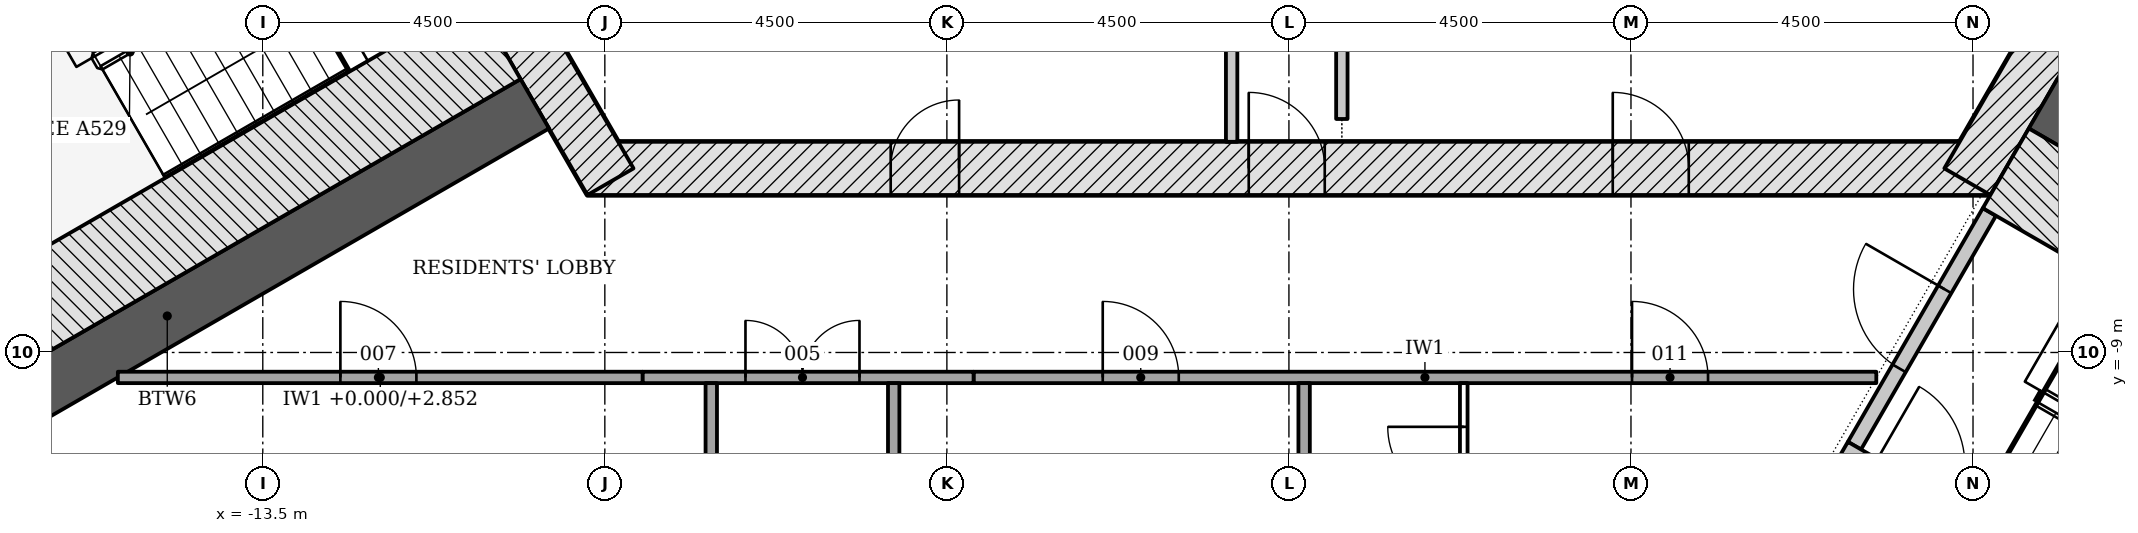
"""IFC4 building model, lengths in metres.
Left out: names, types, materials, properties, quantities, classifications, styles, units other than length and angle.
Written with IfcOpenShell. Run it as: python <this file> out.ifc"""

import sys

from ifc_helpers import new_model, si_unit, direction, frame, frame_2d, origin, place, context, subcontext, project, spatial, rectangle, extrude, element, fill, save


model = new_model("IFC4")
c1 = context("Model", 3, precision=1e-05, world=origin(), true_north=direction((0.0, 1.0)))
c2 = subcontext(c1, "Body", "Model", "MODEL_VIEW")
j1 = project(units=[si_unit("LENGTHUNIT", "METRE"), si_unit("PLANEANGLEUNIT", "RADIAN")], contexts=[c1])
p1 = place(None, origin())
s1 = spatial("IfcSite", under=j1, at=p1, CompositionType="ELEMENT")
p2 = place(p1, origin())
s2 = spatial("IfcBuilding", under=s1, at=p2, CompositionType="ELEMENT")
p3 = place(p2, frame((0.0, 0.0, 140.1)))
s3 = spatial("IfcBuildingStorey", under=s2, at=p3, CompositionType="ELEMENT", Elevation=140.1)
p4 = place(p3, frame((-9.229, -6.578, -0.2), z_axis=(0.0, 0.0, 1.0), x_axis=(1.0, 0.0, 0.0)))
e1 = element("IfcWall", 1, at=p4, inside=s3, PredefinedType="SHEAR", context=c2, shape_type="SweptSolid", body=[
    extrude(rectangle(XDim=18.458, YDim=0.7, at=frame_2d((9.229, 0.0))), origin(), (0.0, 0.0, 1.0), 3.6),
])
p5 = place(p4, frame((8.7, 0.0, 0.2)))
e2 = element("IfcOpeningElement", 2, at=p5, cuts=e1, PredefinedType="OPENING", context=c2, shape_type="SweptSolid", body=[
    extrude(rectangle(XDim=1.0, YDim=2.1, at=frame_2d((0.5, 1.05))), frame((0.0, 0.36, 0.0), z_axis=(0.0, -1.0, 0.0), x_axis=(1.0, 0.0, 0.0)), (0.0, 0.0, 1.0), 0.72),
])
p6 = place(p4, frame((3.99, 0.0, 0.2)))
e3 = element("IfcOpeningElement", 3, at=p6, cuts=e1, PredefinedType="OPENING", context=c2, shape_type="SweptSolid", body=[
    extrude(rectangle(XDim=0.9, YDim=2.1, at=frame_2d((0.45, 1.05))), frame((0.0, 0.36, 0.0), z_axis=(0.0, -1.0, 0.0), x_axis=(1.0, 0.0, 0.0)), (0.0, 0.0, 1.0), 0.72),
])
p7 = place(p4, frame((13.489, 0.0, 0.2)))
e4 = element("IfcOpeningElement", 4, at=p7, cuts=e1, PredefinedType="OPENING", context=c2, shape_type="SweptSolid", body=[
    extrude(rectangle(XDim=1.0, YDim=2.1, at=frame_2d((0.5, 1.05))), frame((0.0, 0.36, 0.0), z_axis=(0.0, -1.0, 0.0), x_axis=(1.0, 0.0, 0.0)), (0.0, 0.0, 1.0), 0.72),
])
for number, where, z_axis, x_axis in (
    (5, (8.926, -6.753, -0.2), (0.0, 0.0, 1.0), (0.5, 0.866, 0.0)),
    (6, (-10.311, -4.353, -0.2), (0.0, 0.0, 1.0), (0.5, -0.866, 0.0)),
):
    element("IfcWall", number, at=place(p3, frame(where, z_axis=z_axis, x_axis=x_axis)), inside=s3, PredefinedType="SHEAR", context=c2, shape_type="SweptSolid", body=[
        extrude(rectangle(XDim=2.771, YDim=0.7, at=frame_2d((1.386, 0.0))), origin(), (0.0, 0.0, 1.0), 3.6),
    ])
for number, where, z_axis, x_axis in (
    (7, (-9.922, -5.728, -0.2), (0.0, 0.0, 1.0), (-0.866, -0.5, 0.0)),
    (8, (9.922, -5.728, -0.2), (0.0, 0.0, 1.0), (0.866, -0.5, 0.0)),
):
    element("IfcWall", number, at=place(p3, frame(where, z_axis=z_axis, x_axis=x_axis)), inside=s3, PredefinedType="SHEAR", context=c2, shape_type="SweptSolid", body=[
        extrude(rectangle(XDim=11.167, YDim=0.75, at=frame_2d((5.583, 0.0))), origin(), (0.0, 0.0, 1.0), 3.6),
    ])
p8 = place(p3, frame((-0.754, 5.772, 0.0), z_axis=(0.0, 0.0, 1.0), x_axis=(0.0, -1.0, 0.0)))
e9 = element("IfcWall", 9, at=p8, inside=s3, PredefinedType="PARTITIONING", context=c2, shape_type="SweptSolid", body=[
    extrude(rectangle(XDim=12.0, YDim=0.15, at=frame_2d((6.0, 0.0))), origin(), (0.0, 0.0, 1.0), 3.4),
])
p9 = place(p8, frame((4.051, 0.0, 0.0)))
e10 = element("IfcOpeningElement", 10, at=p9, cuts=e9, PredefinedType="OPENING", context=c2, shape_type="SweptSolid", body=[
    extrude(rectangle(XDim=0.9, YDim=2.1, at=frame_2d((0.45, 1.05))), frame((0.0, 0.085, 0.0), z_axis=(0.0, -1.0, 0.0), x_axis=(1.0, 0.0, 0.0)), (0.0, 0.0, 1.0), 0.17),
])
p10 = place(p3, frame((0.696, -5.928, 0.0), z_axis=(0.0, 0.0, 1.0), x_axis=(0.0, 1.0, 0.0)))
e11 = element("IfcWall", 11, at=p10, inside=s3, PredefinedType="PARTITIONING", context=c2, shape_type="SweptSolid", body=[
    extrude(rectangle(XDim=11.549, YDim=0.15, at=frame_2d((5.774, 0.0))), origin(), (0.0, 0.0, 1.0), 3.4),
])
p11 = place(p10, frame((6.673, 0.0, 0.0)))
e12 = element("IfcOpeningElement", 12, at=p11, cuts=e11, PredefinedType="OPENING", context=c2, shape_type="SweptSolid", body=[
    extrude(rectangle(XDim=0.9, YDim=2.1, at=frame_2d((0.45, 1.05))), frame((0.0, 0.085, 0.0), z_axis=(0.0, -1.0, 0.0), x_axis=(1.0, 0.0, 0.0)), (0.0, 0.0, 1.0), 0.17),
])
p12 = place(p3, frame((-10.412, -4.879, -0.2), z_axis=(0.0, 0.0, 1.0), x_axis=(-0.866026919366, -0.499997374926, 0.0)))
e13 = element("IfcWall", 13, at=p12, inside=s3, PredefinedType="SHEAR", context=c2, shape_type="SweptSolid", body=[
    extrude(rectangle(XDim=7.2, YDim=1.211, at=frame_2d((3.6, 0.0))), origin(), (0.0, 0.0, 1.0), 3.6),
])
p13 = place(p3, frame((7.44, -10.226, -0.2), z_axis=(0.0, 0.0, 1.0), x_axis=(0.500022077904, 0.866012656725, 0.0)))
e14 = element("IfcWall", 14, at=p13, inside=s3, PredefinedType="SHEAR", context=c2, shape_type="SweptSolid", body=[
    extrude(rectangle(XDim=3.55, YDim=0.2, at=frame_2d((1.775, 0.0))), origin(), (0.0, 0.0, 1.0), 3.6),
])
p14 = place(p13, frame((1.175, 0.0, 0.2)))
e15 = element("IfcOpeningElement", 15, at=p14, cuts=e14, PredefinedType="OPENING", context=c2, shape_type="SweptSolid", body=[
    extrude(rectangle(XDim=1.2, YDim=2.1, at=frame_2d((0.6, 1.05))), frame((0.0, 0.11, 0.0), z_axis=(0.0, -1.0, 0.0), x_axis=(1.0, 0.0, 0.0)), (0.0, 0.0, 1.0), 0.22),
])
p15 = place(p3, frame((7.304, -10.262, -0.2), z_axis=(0.0, 0.0, 1.0), x_axis=(0.866026594901, -0.49999793692, 0.0)))
e16 = element("IfcWall", 16, at=p15, inside=s3, PredefinedType="SHEAR", context=c2, shape_type="SweptSolid", body=[
    extrude(rectangle(XDim=5.6, YDim=0.2, at=frame_2d((2.8, 0.0))), origin(), (0.0, 0.0, 1.0), 3.6),
])
p16 = place(p15, frame((0.45, 0.0, 0.2)))
e17 = element("IfcOpeningElement", 17, at=p16, cuts=e16, PredefinedType="OPENING", context=c2, shape_type="SweptSolid", body=[
    extrude(rectangle(XDim=1.2, YDim=2.1, at=frame_2d((0.6, 1.05))), frame((0.0, 0.11, 0.0), z_axis=(0.0, -1.0, 0.0), x_axis=(1.0, 0.0, 0.0)), (0.0, 0.0, 1.0), 0.22),
])
p17 = place(p3, frame((9.431, -6.577, -0.2), z_axis=(0.0, 0.0, 1.0), x_axis=(0.866018442252, -0.500012057535, 0.0)))
e18 = element("IfcWall", 18, at=p17, inside=s3, PredefinedType="SHEAR", context=c2, shape_type="SweptSolid", body=[
    extrude(rectangle(XDim=7.2, YDim=1.211, at=frame_2d((3.6, 0.0))), origin(), (0.0, 0.0, 1.0), 3.6),
])
p18 = place(p3, frame((15.782, -8.679, 0.0), z_axis=(0.0, 0.0, 1.0), x_axis=(-0.500008408626, 0.866020549008, 0.0)))
e19 = element("IfcWall", 19, at=p18, inside=s3, PredefinedType="PARTITIONING", context=c2, shape_type="SweptSolid", body=[
    extrude(rectangle(XDim=11.258, YDim=0.15, at=frame_2d((5.629, 0.0))), origin(), (0.0, 0.0, 1.0), 2.852),
])
p19 = place(p3, frame((-15.407, -9.328, 0.0), z_axis=(0.0, 0.0, 1.0), x_axis=(1.0, 0.0, 0.0)))
e20 = element("IfcWall", 20, at=p19, inside=s3, PredefinedType="PARTITIONING", context=c2, shape_type="SweptSolid", body=[
    extrude(rectangle(XDim=6.906, YDim=0.15, at=frame_2d((3.453, 0.0))), origin(), (0.0, 0.0, 1.0), 2.852),
])
p20 = place(p19, frame((2.928, 0.0, 0.0)))
e21 = element("IfcOpeningElement", 21, at=p20, cuts=e20, PredefinedType="OPENING", context=c2, shape_type="SweptSolid", body=[
    extrude(rectangle(XDim=1.0, YDim=2.1, at=frame_2d((0.5, 1.05))), frame((0.0, 0.085, 0.0), z_axis=(0.0, -1.0, 0.0), x_axis=(1.0, 0.0, 0.0)), (0.0, 0.0, 1.0), 0.17),
])
p21 = place(p3, frame((-4.149, -9.328, 0.0), z_axis=(0.0, 0.0, 1.0), x_axis=(1.0, 0.0, 0.0)))
e22 = element("IfcWall", 22, at=p21, inside=s3, PredefinedType="PARTITIONING", context=c2, shape_type="SweptSolid", body=[
    extrude(rectangle(XDim=11.876, YDim=0.15, at=frame_2d((5.938, 0.0))), origin(), (0.0, 0.0, 1.0), 2.847),
])
p22 = place(p21, frame((1.699, 0.0, 0.0)))
e23 = element("IfcOpeningElement", 23, at=p22, cuts=e22, PredefinedType="OPENING", context=c2, shape_type="SweptSolid", body=[
    extrude(rectangle(XDim=1.0, YDim=2.1, at=frame_2d((0.5, 1.05))), frame((0.0, 0.085, 0.0), z_axis=(0.0, -1.0, 0.0), x_axis=(1.0, 0.0, 0.0)), (0.0, 0.0, 1.0), 0.17),
])
p23 = place(p21, frame((8.663, 0.0, 0.0)))
e24 = element("IfcOpeningElement", 24, at=p23, cuts=e22, PredefinedType="OPENING", context=c2, shape_type="SweptSolid", body=[
    extrude(rectangle(XDim=1.0, YDim=2.1, at=frame_2d((0.5, 1.05))), frame((0.0, 0.085, 0.0), z_axis=(0.0, -1.0, 0.0), x_axis=(1.0, 0.0, 0.0)), (0.0, 0.0, 1.0), 0.17),
])
p24 = place(p3, frame((-8.501, -9.328, 0.0), z_axis=(0.0, 0.0, 1.0), x_axis=(1.0, 0.0, 0.0)))
e25 = element("IfcWall", 25, at=p24, inside=s3, PredefinedType="PARTITIONING", context=c2, shape_type="SweptSolid", body=[
    extrude(rectangle(XDim=4.353, YDim=0.15, at=frame_2d((2.176, 0.0))), origin(), (0.0, 0.0, 1.0), 2.847),
])
p25 = place(p24, frame((1.352, 0.0, 0.0)))
e26 = element("IfcOpeningElement", 26, at=p25, cuts=e25, PredefinedType="OPENING", context=c2, shape_type="SweptSolid", body=[
    extrude(rectangle(XDim=1.5, YDim=2.1, at=frame_2d((0.75, 1.05))), frame((0.0, 0.085, 0.0), z_axis=(0.0, -1.0, 0.0), x_axis=(1.0, 0.0, 0.0)), (0.0, 0.0, 1.0), 0.17),
])
p26 = place(p3, frame((0.2, -16.021, 0.0), z_axis=(0.0, 0.0, 1.0), x_axis=(0.0, 1.0, 0.0)))
e27 = element("IfcWall", 27, at=p26, inside=s3, PredefinedType="PARTITIONING", context=c2, shape_type="SweptSolid", body=[
    extrude(rectangle(XDim=6.617, YDim=0.15, at=frame_2d((3.309, 0.0))), origin(), (0.0, 0.0, 1.0), 3.4),
])
for number, where, z_axis, x_axis in (
    (28, (-7.6, -9.403, 0.0), (0.0, 0.0, 1.0), (0.0, -1.0, 0.0)),
    (29, (-5.2, -9.403, 0.0), (0.0, 0.0, 1.0), (0.0, -1.0, 0.0)),
):
    element("IfcWall", number, at=place(p3, frame(where, z_axis=z_axis, x_axis=x_axis)), inside=s3, PredefinedType="PARTITIONING", context=c2, shape_type="SweptSolid", body=[
        extrude(rectangle(XDim=4.417, YDim=0.15, at=frame_2d((2.208, 0.0))), origin(), (0.0, 0.0, 1.0), 3.4),
    ])
p27 = place(p3, frame((2.3, -11.578, 0.0), z_axis=(0.0, 0.0, 1.0), x_axis=(0.0, 1.0, 0.0)))
e30 = element("IfcWall", 30, at=p27, inside=s3, PredefinedType="PARTITIONING", context=c2, shape_type="SweptSolid", body=[
    extrude(rectangle(XDim=2.175, YDim=0.1, at=frame_2d((1.087, 0.0))), origin(), (0.0, 0.0, 1.0), 3.4),
])
p28 = place(p27, frame((0.6, 0.0, 0.0)))
e31 = element("IfcOpeningElement", 31, at=p28, cuts=e30, PredefinedType="OPENING", context=c2, shape_type="SweptSolid", body=[
    extrude(rectangle(XDim=1.0, YDim=2.1, at=frame_2d((0.5, 1.05))), frame((0.0, 0.06, 0.0), z_axis=(0.0, -1.0, 0.0), x_axis=(1.0, 0.0, 0.0)), (0.0, 0.0, 1.0), 0.12),
])
p29 = place(p5, origin())
e32 = element("IfcDoor", 32, at=p29, inside=s3, OperationType="SINGLE_SWING_LEFT", PredefinedType="DOOR", context=c2, shape_type="SweptSolid", body=[
    extrude(rectangle(XDim=1.0, YDim=2.1, at=frame_2d((0.5, 1.05))), frame((0.0, 0.075, 0.0), z_axis=(0.0, -1.0, 0.0), x_axis=(1.0, 0.0, 0.0)), (0.0, 0.0, 1.0), 0.15),
])
fill(e2, e32)
p30 = place(p6, origin())
e33 = element("IfcDoor", 33, at=p30, inside=s3, OperationType="SINGLE_SWING_RIGHT", PredefinedType="DOOR", context=c2, shape_type="SweptSolid", body=[
    extrude(rectangle(XDim=0.9, YDim=2.1, at=frame_2d((0.45, 1.05))), frame((0.0, 0.075, 0.0), z_axis=(0.0, -1.0, 0.0), x_axis=(1.0, 0.0, 0.0)), (0.0, 0.0, 1.0), 0.15),
])
fill(e3, e33)
p31 = place(p7, origin())
e34 = element("IfcDoor", 34, at=p31, inside=s3, OperationType="SINGLE_SWING_LEFT", PredefinedType="DOOR", context=c2, shape_type="SweptSolid", body=[
    extrude(rectangle(XDim=1.0, YDim=2.1, at=frame_2d((0.5, 1.05))), frame((0.0, 0.075, 0.0), z_axis=(0.0, -1.0, 0.0), x_axis=(1.0, 0.0, 0.0)), (0.0, 0.0, 1.0), 0.15),
])
fill(e4, e34)
p32 = place(p14, origin())
e35 = element("IfcDoor", 35, at=p32, inside=s3, OperationType="SINGLE_SWING_RIGHT", PredefinedType="DOOR", context=c2, shape_type="SweptSolid", body=[
    extrude(rectangle(XDim=1.2, YDim=2.1, at=frame_2d((0.6, 1.05))), frame((0.0, 0.025, 0.0), z_axis=(0.0, -1.0, 0.0), x_axis=(1.0, 0.0, 0.0)), (0.0, 0.0, 1.0), 0.05),
])
fill(e15, e35)
p33 = place(p25, origin())
e36 = element("IfcDoor", 36, at=p33, inside=s3, OperationType="DOUBLE_DOOR_SINGLE_SWING", PredefinedType="DOOR", context=c2, shape_type="SweptSolid", body=[
    extrude(rectangle(XDim=1.5, YDim=2.1, at=frame_2d((0.75, 1.05))), frame((0.0, 0.025, 0.0), z_axis=(0.0, -1.0, 0.0), x_axis=(1.0, 0.0, 0.0)), (0.0, 0.0, 1.0), 0.05),
])
fill(e26, e36)
p34 = place(p20, origin())
e37 = element("IfcDoor", 37, at=p34, inside=s3, OperationType="SINGLE_SWING_LEFT", PredefinedType="DOOR", context=c2, shape_type="SweptSolid", body=[
    extrude(rectangle(XDim=1.0, YDim=2.1, at=frame_2d((0.5, 1.05))), frame((0.0, 0.025, 0.0), z_axis=(0.0, -1.0, 0.0), x_axis=(1.0, 0.0, 0.0)), (0.0, 0.0, 1.0), 0.05),
])
fill(e21, e37)
p35 = place(p22, origin())
e38 = element("IfcDoor", 38, at=p35, inside=s3, OperationType="SINGLE_SWING_LEFT", PredefinedType="DOOR", context=c2, shape_type="SweptSolid", body=[
    extrude(rectangle(XDim=1.0, YDim=2.1, at=frame_2d((0.5, 1.05))), frame((0.0, 0.025, 0.0), z_axis=(0.0, -1.0, 0.0), x_axis=(1.0, 0.0, 0.0)), (0.0, 0.0, 1.0), 0.05),
])
fill(e23, e38)
p36 = place(p28, origin())
e39 = element("IfcDoor", 39, at=p36, inside=s3, OperationType="SINGLE_SWING_RIGHT", PredefinedType="DOOR", context=c2, shape_type="SweptSolid", body=[
    extrude(rectangle(XDim=1.0, YDim=2.1, at=frame_2d((0.5, 1.05))), frame((0.0, 0.025, 0.0), z_axis=(0.0, -1.0, 0.0), x_axis=(1.0, 0.0, 0.0)), (0.0, 0.0, 1.0), 0.05),
])
fill(e31, e39)
p37 = place(p23, origin())
e40 = element("IfcDoor", 40, at=p37, inside=s3, OperationType="SINGLE_SWING_LEFT", PredefinedType="DOOR", context=c2, shape_type="SweptSolid", body=[
    extrude(rectangle(XDim=1.0, YDim=2.1, at=frame_2d((0.5, 1.05))), frame((0.0, 0.025, 0.0), z_axis=(0.0, -1.0, 0.0), x_axis=(1.0, 0.0, 0.0)), (0.0, 0.0, 1.0), 0.05),
])
fill(e24, e40)
save(model, sys.argv[1])
